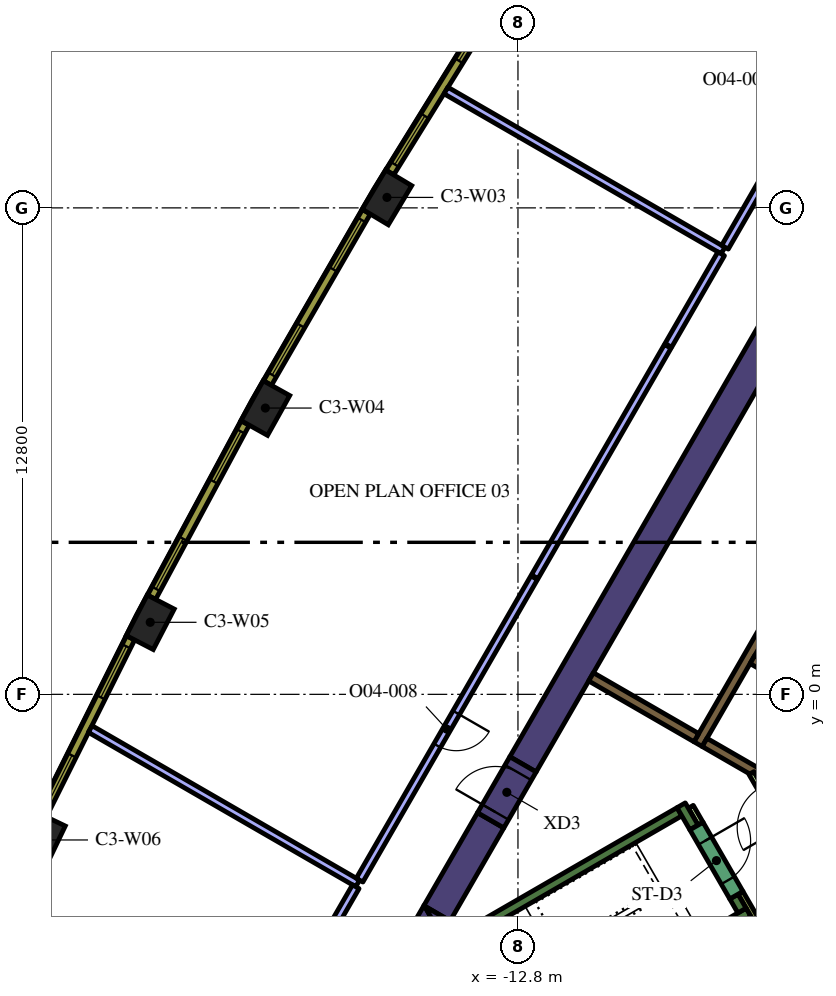
"""IFC4 building model, lengths in metres.
Left out: names, types, materials, properties, quantities, classifications, styles, units other than length and angle.
Written with IfcOpenShell. Run it as: python <this file> out.ifc"""

import sys

from ifc_helpers import new_model, si_unit, direction, frame, frame_2d, origin, origin_2d, place, context, subcontext, project, spatial, polyline, rectangle, outline, extrude, element, fill, save


model = new_model("IFC4")
c1 = context("Model", 3, precision=1e-05, world=origin(), true_north=direction((0.0, 1.0)))
c2 = subcontext(c1, "Body", "Model", "MODEL_VIEW")
j1 = project(units=[si_unit("LENGTHUNIT", "METRE"), si_unit("PLANEANGLEUNIT", "RADIAN")], contexts=[c1])
p1 = place(None, origin())
s1 = spatial("IfcSite", under=j1, at=p1, CompositionType="ELEMENT")
p2 = place(p1, origin())
s2 = spatial("IfcBuilding", under=s1, at=p2, CompositionType="ELEMENT")
p3 = place(p2, frame((0.0, 0.0, 187.8)))
s3 = spatial("IfcBuildingStorey", under=s2, at=p3, CompositionType="ELEMENT", Elevation=187.8)
for number, where, z_axis, x_axis in (
    (1, (-16.247, 13.075, 0.0), (0.0, 0.0, 1.0), (-0.513, -0.858, 0.0)),
    (2, (-19.447, 7.533, 0.0), (0.0, 0.0, 1.0), (-0.487, -0.874, 0.0)),
    (3, (-22.476, 1.896, 0.0), (0.0, 0.0, 1.0), (-0.46, -0.888, 0.0)),
    (4, (-25.332, -3.832, 0.0), (0.0, 0.0, 1.0), (-0.433, -0.902, 0.0)),
):
    element("IfcColumn", number, at=place(p3, frame(where, z_axis=z_axis, x_axis=x_axis)), inside=s3, PredefinedType="COLUMN", context=c2, shape_type="SweptSolid", body=[
        extrude(rectangle(XDim=1.2, YDim=0.8, at=origin_2d()), origin(), (0.0, 0.0, 1.0), 4.2),
    ])
p4 = place(p3, origin())
e5 = element("IfcWall", 5, at=p4, inside=s3, PredefinedType="SOLIDWALL", context=c2, shape_type="SweptSolid", body=[
    extrude(outline(polyline([(-15.047, -5.938), (-15.719, -6.326), (-15.271, -5.55), (-15.047, -5.938)])), origin(), (0.0, 0.0, 1.0), 4.2),
])
p5 = place(p3, frame((-13.518, -3.314, 0.0), z_axis=(0.0, 0.0, 1.0), x_axis=(-0.499969377405, -0.866043083026, 0.0)))
e6 = element("IfcWall", 6, at=p5, inside=s3, PredefinedType="SOLIDWALL", context=c2, shape_type="SweptSolid", body=[
    extrude(rectangle(XDim=2.824, YDim=0.8, at=frame_2d((1.412, 0.0))), origin(), (0.0, 0.0, 1.0), 4.2),
])
e7 = element("IfcWall", 7, at=p4, inside=s3, PredefinedType="SOLIDWALL", context=c2, shape_type="SweptSolid", body=[
    extrude(outline(polyline([(-14.809, -6.35), (-15.257, -5.574), (-14.585, -5.962), (-14.809, -6.35)])), origin(), (0.0, 0.0, 1.0), 4.2),
])
p6 = place(p3, frame((-12.668, -1.842, 0.0), z_axis=(0.0, 0.0, 1.0), x_axis=(0.500003640647, 0.866023301845, 0.0)))
e8 = element("IfcWall", 8, at=p6, inside=s3, PredefinedType="SOLIDWALL", context=c2, shape_type="SweptSolid", body=[
    extrude(rectangle(XDim=15.858, YDim=0.8, at=frame_2d((7.929, 0.0))), origin(), (0.0, 0.0, 1.0), 4.2),
])
p7 = place(p3, frame((-14.44, -6.49, 0.0), z_axis=(0.0, 0.0, 1.0), x_axis=(0.866022966069, 0.500004222222, 0.0)))
e9 = element("IfcWall", 9, at=p7, inside=s3, PredefinedType="SOLIDWALL", context=c2, shape_type="SweptSolid", body=[
    extrude(rectangle(XDim=6.8, YDim=0.25, at=frame_2d((3.4, 0.0))), origin(), (0.0, 0.0, 1.0), 4.2),
])
p8 = place(p3, frame((-8.168, -3.503, 0.0), z_axis=(0.0, 0.0, 1.0), x_axis=(-0.499952099219, 0.866053057547, 0.0)))
e10 = element("IfcWall", 10, at=p8, inside=s3, PredefinedType="SOLIDWALL", context=c2, shape_type="SweptSolid", body=[
    extrude(rectangle(XDim=0.675, YDim=0.25, at=frame_2d((0.337, 0.0))), origin(), (0.0, 0.0, 1.0), 4.2),
])
p9 = place(p3, frame((-12.84, -9.261, 0.0), z_axis=(0.0, 0.0, 1.0), x_axis=(0.866016039709, 0.500016218704, 0.0)))
e11 = element("IfcWall", 11, at=p9, inside=s3, PredefinedType="SOLIDWALL", context=c2, shape_type="SweptSolid", body=[
    extrude(rectangle(XDim=7.05, YDim=0.25, at=frame_2d((3.525, 0.0))), origin(), (0.0, 0.0, 1.0), 4.2),
])
p10 = place(p3, frame((-6.905, -5.69, 0.0), z_axis=(0.0, 0.0, 1.0), x_axis=(-0.500402024738, 0.865793170242, 0.0)))
e12 = element("IfcWall", 12, at=p10, inside=s3, PredefinedType="SOLIDWALL", context=c2, shape_type="SweptSolid", body=[
    extrude(rectangle(XDim=0.425, YDim=0.25, at=frame_2d((0.212, 0.0))), origin(), (0.0, 0.0, 1.0), 4.2),
])
p11 = place(p3, frame((-8.06, -1.311, 0.0), z_axis=(0.0, 0.0, 1.0), x_axis=(0.50000273126, 0.866023826885, 0.0)))
e13 = element("IfcWall", 13, at=p11, inside=s3, PredefinedType="SOLIDWALL", context=c2, shape_type="SweptSolid", body=[
    extrude(rectangle(XDim=10.33, YDim=0.25, at=frame_2d((5.165, 0.0))), origin(), (0.0, 0.0, 1.0), 4.2),
])
p12 = place(p3, frame((-4.724, -0.182, 0.0), z_axis=(0.0, 0.0, 1.0), x_axis=(-0.866008176907, 0.50002983664, 0.0)))
e14 = element("IfcWall", 14, at=p12, inside=s3, PredefinedType="SOLIDWALL", context=c2, shape_type="SweptSolid", body=[
    extrude(rectangle(XDim=2.2, YDim=0.25, at=frame_2d((1.1, 0.0))), origin(), (0.0, 0.0, 1.0), 4.2),
])
e15 = element("IfcWall", 15, at=p4, inside=s3, PredefinedType="SOLIDWALL", context=c2, shape_type="SweptSolid", body=[
    extrude(outline(polyline([(-5.922, -2.257), (-5.922, -2.257), (-5.705, -2.382), (-5.83, -2.598), (-6.483, -2.221), (-6.591, -2.033), (-6.591, -2.033), (-6.7, -2.096), (-7.952, -1.373), (-7.827, -1.156), (-5.922, -2.257)])), origin(), (0.0, 0.0, 1.0), 4.2),
])
p13 = place(p3, frame((-8.106, -1.14, 0.0), z_axis=(0.0, 0.0, 1.0), x_axis=(-0.866008981251, 0.500028443584, 0.0)))
e16 = element("IfcWall", 16, at=p13, inside=s3, PredefinedType="SOLIDWALL", context=c2, shape_type="SweptSolid", body=[
    extrude(rectangle(XDim=3.2, YDim=0.25, at=frame_2d((1.6, 0.0))), origin(), (0.0, 0.0, 1.0), 4.2),
])
p14 = place(p3, frame((-8.252, -2.958, 0.0), z_axis=(0.0, 0.0, 1.0), x_axis=(0.500174715838, -0.865924508047, 0.0)))
e17 = element("IfcWall", 17, at=p14, inside=s3, PredefinedType="PARTITIONING", context=c2, shape_type="SweptSolid", body=[
    extrude(rectangle(XDim=0.514, YDim=0.15, at=frame_2d((0.257, 0.0))), origin(), (0.0, 0.0, 1.0), 3.15),
])
p15 = place(p3, frame((-6.48, -6.027, 0.0), z_axis=(0.0, 0.0, 1.0), x_axis=(-0.499927229454, 0.866067413802, 0.0)))
e18 = element("IfcWall", 18, at=p15, inside=s3, PredefinedType="PARTITIONING", context=c2, shape_type="SweptSolid", body=[
    extrude(rectangle(XDim=0.929, YDim=0.15, at=frame_2d((0.464, 0.0))), origin(), (0.0, 0.0, 1.0), 4.2),
])
p16 = place(p3, frame((-8.103, -3.466, 0.0), z_axis=(0.0, 0.0, 1.0), x_axis=(0.500078061341, -0.865980330357, 0.0)))
e19 = element("IfcWall", 19, at=p16, inside=s3, PredefinedType="SOLIDWALL", context=c2, shape_type="SweptSolid", body=[
    extrude(rectangle(XDim=2.1, YDim=0.4, at=frame_2d((1.05, 0.0))), origin(), (0.0, 0.0, 1.0), 4.2),
])
p17 = place(p16, frame((0.45, 0.0, 0.0)))
e20 = element("IfcOpeningElement", 20, at=p17, cuts=e19, PredefinedType="OPENING", context=c2, shape_type="SweptSolid", body=[
    extrude(rectangle(XDim=1.2, YDim=2.1, at=frame_2d((0.6, 1.05))), frame((0.0, 0.21, 0.0), z_axis=(0.0, -1.0, 0.0), x_axis=(1.0, 0.0, 0.0)), (0.0, 0.0, 1.0), 0.42),
])
p18 = place(p3, frame((-5.606, -3.89, 0.0), z_axis=(0.0, 0.0, 1.0), x_axis=(-0.500027713859, 0.866009402589, 0.0)))
e21 = element("IfcWall", 21, at=p18, inside=s3, PredefinedType="PARTITIONING", context=c2, shape_type="SweptSolid", body=[
    extrude(rectangle(XDim=2.1, YDim=0.15, at=frame_2d((1.05, 0.0))), origin(), (0.0, 0.0, 1.0), 3.15),
])
p19 = place(p18, frame((0.45, 0.0, 0.0)))
e22 = element("IfcOpeningElement", 22, at=p19, cuts=e21, PredefinedType="OPENING", context=c2, shape_type="SweptSolid", body=[
    extrude(rectangle(XDim=1.2, YDim=2.1, at=frame_2d((0.6, 1.05))), frame((0.0, 0.085, 0.0), z_axis=(0.0, -1.0, 0.0), x_axis=(1.0, 0.0, 0.0)), (0.0, 0.0, 1.0), 0.17),
])
p20 = place(p3, frame((-13.518, -3.314, 0.0), z_axis=(0.0, 0.0, 1.0), x_axis=(0.500000056704, 0.866025371046, 0.0)))
e23 = element("IfcWall", 23, at=p20, inside=s3, PredefinedType="SOLIDWALL", context=c2, shape_type="SweptSolid", body=[
    extrude(rectangle(XDim=1.7, YDim=0.8, at=frame_2d((0.85, 0.0))), origin(), (0.0, 0.0, 1.0), 4.2),
])
p21 = place(p20, frame((0.25, 0.0, 0.0)))
e24 = element("IfcOpeningElement", 24, at=p21, cuts=e23, PredefinedType="OPENING", context=c2, shape_type="SweptSolid", body=[
    extrude(rectangle(XDim=1.2, YDim=2.1, at=frame_2d((0.6, 1.05))), frame((0.0, 0.41, 0.0), z_axis=(0.0, -1.0, 0.0), x_axis=(1.0, 0.0, 0.0)), (0.0, 0.0, 1.0), 0.82),
])
p22 = place(p3, frame((-7.403, 11.678, 0.0), z_axis=(0.0, 0.0, 1.0), x_axis=(-0.866029143232, 0.499993523031, 0.0)))
e25 = element("IfcWall", 25, at=p22, inside=s3, PredefinedType="PARTITIONING", context=c2, shape_type="SweptSolid", body=[
    extrude(rectangle(XDim=8.42, YDim=0.2, at=frame_2d((4.21, 0.0))), origin(), (0.0, 0.0, 1.0), 3.15),
])
p23 = place(p3, frame((-3.421, 18.574, 0.0), z_axis=(0.0, 0.0, 1.0), x_axis=(-0.499989434416, -0.866031503741, 0.0)))
e26 = element("IfcWall", 26, at=p23, inside=s3, PredefinedType="PARTITIONING", context=c2, shape_type="SweptSolid", body=[
    extrude(rectangle(XDim=7.863, YDim=0.2, at=frame_2d((3.932, 0.0))), origin(), (0.0, 0.0, 1.0), 3.15),
])
p24 = place(p23, frame((3.4, 0.0, 0.0)))
e27 = element("IfcOpeningElement", 27, at=p24, cuts=e26, PredefinedType="OPENING", context=c2, shape_type="SweptSolid", body=[
    extrude(rectangle(XDim=1.0, YDim=2.1, at=frame_2d((0.5, 1.05))), frame((0.0, 0.11, 0.0), z_axis=(0.0, -1.0, 0.0), x_axis=(1.0, 0.0, 0.0)), (0.0, 0.0, 1.0), 0.22),
])
p25 = place(p3, frame((-17.018, -4.976, 0.0), z_axis=(0.0, 0.0, 1.0), x_axis=(-0.866034495264, 0.499984252764, 0.0)))
e28 = element("IfcWall", 28, at=p25, inside=s3, PredefinedType="PARTITIONING", context=c2, shape_type="SweptSolid", body=[
    extrude(rectangle(XDim=8.126, YDim=0.2, at=frame_2d((4.063, 0.0))), origin(), (0.0, 0.0, 1.0), 3.15),
])
p26 = place(p3, frame((-8.859, 9.156, 0.0), z_axis=(0.0, 0.0, 1.0), x_axis=(-0.500010275428, -0.866019471182, 0.0)))
e29 = element("IfcWall", 29, at=p26, inside=s3, PredefinedType="PARTITIONING", context=c2, shape_type="SweptSolid", body=[
    extrude(rectangle(XDim=7.0, YDim=0.2, at=frame_2d((3.5, 0.0))), origin(), (0.0, 0.0, 1.0), 3.15),
])
p27 = place(p3, frame((-12.374, 3.068, 0.0), z_axis=(0.0, 0.0, 1.0), x_axis=(-0.50000000053, -0.866025403479, 0.0)))
e30 = element("IfcWall", 30, at=p27, inside=s3, PredefinedType="PARTITIONING", context=c2, shape_type="SweptSolid", body=[
    extrude(rectangle(XDim=9.188, YDim=0.2, at=frame_2d((4.594, 0.0))), origin(), (0.0, 0.0, 1.0), 3.15),
])
p28 = place(p27, frame((4.1, 0.0, 0.0)))
e31 = element("IfcOpeningElement", 31, at=p28, cuts=e30, PredefinedType="OPENING", context=c2, shape_type="SweptSolid", body=[
    extrude(rectangle(XDim=1.0, YDim=2.1, at=frame_2d((0.5, 1.05))), frame((0.0, 0.11, 0.0), z_axis=(0.0, -1.0, 0.0), x_axis=(1.0, 0.0, 0.0)), (0.0, 0.0, 1.0), 0.22),
])
p29 = place(p3, frame((-7.453, 11.591, 0.0), z_axis=(0.0, 0.0, 1.0), x_axis=(-0.499980749935, -0.866036517529, 0.0)))
e32 = element("IfcWall", 32, at=p29, inside=s3, PredefinedType="PARTITIONING", context=c2, shape_type="SweptSolid", body=[
    extrude(rectangle(XDim=2.782, YDim=0.2, at=frame_2d((1.391, 0.0))), origin(), (0.0, 0.0, 1.0), 3.15),
])
p30 = place(p3, frame((-17.068, -5.062, 0.0), z_axis=(0.0, 0.0, 1.0), x_axis=(-0.499935638681, -0.86606255962, 0.0)))
e33 = element("IfcWall", 33, at=p30, inside=s3, PredefinedType="PARTITIONING", context=c2, shape_type="SweptSolid", body=[
    extrude(rectangle(XDim=1.487, YDim=0.2, at=frame_2d((0.744, 0.0))), origin(), (0.0, 0.0, 1.0), 3.15),
])
p31 = place(p3, frame((-13.433, 18.156, 0.0), z_axis=(0.0, 0.0, 1.0), x_axis=(-0.526197926587, -0.850362124072, 0.0)))
e34 = element("IfcWall", 34, at=p31, inside=s3, PredefinedType="SOLIDWALL", context=c2, shape_type="SweptSolid", body=[
    extrude(rectangle(XDim=5.203, YDim=0.24, at=frame_2d((2.602, 0.0))), origin(), (0.0, 0.0, 1.0), 3.95),
])
p32 = place(p31, frame((0.248, 0.0, 0.9)))
e35 = element("IfcOpeningElement", 35, at=p32, cuts=e34, PredefinedType="OPENING", context=c2, shape_type="SweptSolid", body=[
    extrude(rectangle(XDim=1.5, YDim=2.55, at=frame_2d((0.75, 1.275))), frame((0.0, 0.13, 0.0), z_axis=(0.0, -1.0, 0.0), x_axis=(1.0, 0.0, 0.0)), (0.0, 0.0, 1.0), 0.26),
])
p33 = place(p31, frame((3.455, 0.0, 0.9)))
e36 = element("IfcOpeningElement", 36, at=p33, cuts=e34, PredefinedType="OPENING", context=c2, shape_type="SweptSolid", body=[
    extrude(rectangle(XDim=1.5, YDim=2.55, at=frame_2d((0.75, 1.275))), frame((0.0, 0.13, 0.0), z_axis=(0.0, -1.0, 0.0), x_axis=(1.0, 0.0, 0.0)), (0.0, 0.0, 1.0), 0.26),
])
p34 = place(p3, frame((-16.789, 12.697, 0.0), z_axis=(0.0, 0.0, 1.0), x_axis=(-0.500009456303, -0.866019944116, 0.0)))
e37 = element("IfcWall", 37, at=p34, inside=s3, PredefinedType="SOLIDWALL", context=c2, shape_type="SweptSolid", body=[
    extrude(rectangle(XDim=5.204, YDim=0.24, at=frame_2d((2.602, 0.0))), origin(), (0.0, 0.0, 1.0), 3.95),
])
p35 = place(p34, frame((0.248, 0.0, 0.9)))
e38 = element("IfcOpeningElement", 38, at=p35, cuts=e37, PredefinedType="OPENING", context=c2, shape_type="SweptSolid", body=[
    extrude(rectangle(XDim=1.5, YDim=2.55, at=frame_2d((0.75, 1.275))), frame((0.0, 0.13, 0.0), z_axis=(0.0, -1.0, 0.0), x_axis=(1.0, 0.0, 0.0)), (0.0, 0.0, 1.0), 0.26),
])
p36 = place(p34, frame((3.455, 0.0, 0.9)))
e39 = element("IfcOpeningElement", 39, at=p36, cuts=e37, PredefinedType="OPENING", context=c2, shape_type="SweptSolid", body=[
    extrude(rectangle(XDim=1.5, YDim=2.55, at=frame_2d((0.75, 1.275))), frame((0.0, 0.13, 0.0), z_axis=(0.0, -1.0, 0.0), x_axis=(1.0, 0.0, 0.0)), (0.0, 0.0, 1.0), 0.26),
])
p37 = place(p3, frame((-19.977, 7.139, 0.0), z_axis=(0.0, 0.0, 1.0), x_axis=(-0.473349833294, -0.880874528704, 0.0)))
e40 = element("IfcWall", 40, at=p37, inside=s3, PredefinedType="SOLIDWALL", context=c2, shape_type="SweptSolid", body=[
    extrude(rectangle(XDim=5.204, YDim=0.24, at=frame_2d((2.602, 0.0))), origin(), (0.0, 0.0, 1.0), 3.95),
])
p38 = place(p37, frame((0.248, 0.0, 0.9)))
e41 = element("IfcOpeningElement", 41, at=p38, cuts=e40, PredefinedType="OPENING", context=c2, shape_type="SweptSolid", body=[
    extrude(rectangle(XDim=1.5, YDim=2.55, at=frame_2d((0.75, 1.275))), frame((0.0, 0.13, 0.0), z_axis=(0.0, -1.0, 0.0), x_axis=(1.0, 0.0, 0.0)), (0.0, 0.0, 1.0), 0.26),
])
p39 = place(p37, frame((3.455, 0.0, 0.9)))
e42 = element("IfcOpeningElement", 42, at=p39, cuts=e40, PredefinedType="OPENING", context=c2, shape_type="SweptSolid", body=[
    extrude(rectangle(XDim=1.5, YDim=2.55, at=frame_2d((0.75, 1.275))), frame((0.0, 0.13, 0.0), z_axis=(0.0, -1.0, 0.0), x_axis=(1.0, 0.0, 0.0)), (0.0, 0.0, 1.0), 0.26),
])
p40 = place(p3, frame((-22.994, 1.485, 0.0), z_axis=(0.0, 0.0, 1.0), x_axis=(-0.446256171312, -0.8949052629, 0.0)))
e43 = element("IfcWall", 43, at=p40, inside=s3, PredefinedType="SOLIDWALL", context=c2, shape_type="SweptSolid", body=[
    extrude(rectangle(XDim=5.203, YDim=0.24, at=frame_2d((2.602, 0.0))), origin(), (0.0, 0.0, 1.0), 3.95),
])
p41 = place(p40, frame((0.248, 0.0, 0.9)))
e44 = element("IfcOpeningElement", 44, at=p41, cuts=e43, PredefinedType="OPENING", context=c2, shape_type="SweptSolid", body=[
    extrude(rectangle(XDim=1.5, YDim=2.55, at=frame_2d((0.75, 1.275))), frame((0.0, 0.13, 0.0), z_axis=(0.0, -1.0, 0.0), x_axis=(1.0, 0.0, 0.0)), (0.0, 0.0, 1.0), 0.26),
])
p42 = place(p40, frame((3.455, 0.0, 0.9)))
e45 = element("IfcOpeningElement", 45, at=p42, cuts=e43, PredefinedType="OPENING", context=c2, shape_type="SweptSolid", body=[
    extrude(rectangle(XDim=1.5, YDim=2.55, at=frame_2d((0.75, 1.275))), frame((0.0, 0.13, 0.0), z_axis=(0.0, -1.0, 0.0), x_axis=(1.0, 0.0, 0.0)), (0.0, 0.0, 1.0), 0.26),
])
p43 = place(p17, origin())
e46 = element("IfcDoor", 46, at=p43, inside=s3, OperationType="SINGLE_SWING_LEFT", PredefinedType="DOOR", context=c2, shape_type="SweptSolid", body=[
    extrude(rectangle(XDim=1.2, YDim=2.1, at=frame_2d((0.6, 1.05))), frame((0.0, 0.025, 0.0), z_axis=(0.0, -1.0, 0.0), x_axis=(1.0, 0.0, 0.0)), (0.0, 0.0, 1.0), 0.05),
])
fill(e20, e46)
p44 = place(p21, origin())
e47 = element("IfcDoor", 47, at=p44, inside=s3, OperationType="SINGLE_SWING_LEFT", PredefinedType="DOOR", context=c2, shape_type="SweptSolid", body=[
    extrude(rectangle(XDim=1.2, YDim=2.1, at=frame_2d((0.6, 1.05))), frame((0.0, 0.025, 0.0), z_axis=(0.0, -1.0, 0.0), x_axis=(1.0, 0.0, 0.0)), (0.0, 0.0, 1.0), 0.05),
])
fill(e24, e47)
p45 = place(p28, origin())
e48 = element("IfcDoor", 48, at=p45, inside=s3, OperationType="SINGLE_SWING_RIGHT", PredefinedType="DOOR", context=c2, shape_type="SweptSolid", body=[
    extrude(rectangle(XDim=1.0, YDim=2.1, at=frame_2d((0.5, 1.05))), frame((0.0, 0.025, 0.0), z_axis=(0.0, -1.0, 0.0), x_axis=(1.0, 0.0, 0.0)), (0.0, 0.0, 1.0), 0.05),
])
fill(e31, e48)
p46 = place(p32, origin())
e49 = element("IfcWindow", 49, at=p46, inside=s3, PartitioningType="SINGLE_PANEL", PredefinedType="WINDOW", context=c2, shape_type="SweptSolid", body=[
    extrude(rectangle(XDim=1.5, YDim=2.55, at=frame_2d((0.75, 1.275))), frame((0.0, 0.04, 0.0), z_axis=(0.0, -1.0, 0.0), x_axis=(1.0, 0.0, 0.0)), (0.0, 0.0, 1.0), 0.06),
])
fill(e35, e49)
p47 = place(p33, origin())
e50 = element("IfcWindow", 50, at=p47, inside=s3, PartitioningType="SINGLE_PANEL", PredefinedType="WINDOW", context=c2, shape_type="SweptSolid", body=[
    extrude(rectangle(XDim=1.5, YDim=2.55, at=frame_2d((0.75, 1.275))), frame((0.0, 0.04, 0.0), z_axis=(0.0, -1.0, 0.0), x_axis=(1.0, 0.0, 0.0)), (0.0, 0.0, 1.0), 0.06),
])
fill(e36, e50)
p48 = place(p35, origin())
e51 = element("IfcWindow", 51, at=p48, inside=s3, PartitioningType="SINGLE_PANEL", PredefinedType="WINDOW", context=c2, shape_type="SweptSolid", body=[
    extrude(rectangle(XDim=1.5, YDim=2.55, at=frame_2d((0.75, 1.275))), frame((0.0, 0.04, 0.0), z_axis=(0.0, -1.0, 0.0), x_axis=(1.0, 0.0, 0.0)), (0.0, 0.0, 1.0), 0.06),
])
fill(e38, e51)
p49 = place(p36, origin())
e52 = element("IfcWindow", 52, at=p49, inside=s3, PartitioningType="SINGLE_PANEL", PredefinedType="WINDOW", context=c2, shape_type="SweptSolid", body=[
    extrude(rectangle(XDim=1.5, YDim=2.55, at=frame_2d((0.75, 1.275))), frame((0.0, 0.04, 0.0), z_axis=(0.0, -1.0, 0.0), x_axis=(1.0, 0.0, 0.0)), (0.0, 0.0, 1.0), 0.06),
])
fill(e39, e52)
p50 = place(p38, origin())
e53 = element("IfcWindow", 53, at=p50, inside=s3, PartitioningType="SINGLE_PANEL", PredefinedType="WINDOW", context=c2, shape_type="SweptSolid", body=[
    extrude(rectangle(XDim=1.5, YDim=2.55, at=frame_2d((0.75, 1.275))), frame((0.0, 0.04, 0.0), z_axis=(0.0, -1.0, 0.0), x_axis=(1.0, 0.0, 0.0)), (0.0, 0.0, 1.0), 0.06),
])
fill(e41, e53)
p51 = place(p39, origin())
e54 = element("IfcWindow", 54, at=p51, inside=s3, PartitioningType="SINGLE_PANEL", PredefinedType="WINDOW", context=c2, shape_type="SweptSolid", body=[
    extrude(rectangle(XDim=1.5, YDim=2.55, at=frame_2d((0.75, 1.275))), frame((0.0, 0.04, 0.0), z_axis=(0.0, -1.0, 0.0), x_axis=(1.0, 0.0, 0.0)), (0.0, 0.0, 1.0), 0.06),
])
fill(e42, e54)
p52 = place(p41, origin())
e55 = element("IfcWindow", 55, at=p52, inside=s3, PartitioningType="SINGLE_PANEL", PredefinedType="WINDOW", context=c2, shape_type="SweptSolid", body=[
    extrude(rectangle(XDim=1.5, YDim=2.55, at=frame_2d((0.75, 1.275))), frame((0.0, 0.04, 0.0), z_axis=(0.0, -1.0, 0.0), x_axis=(1.0, 0.0, 0.0)), (0.0, 0.0, 1.0), 0.06),
])
fill(e44, e55)
p53 = place(p42, origin())
e56 = element("IfcWindow", 56, at=p53, inside=s3, PartitioningType="SINGLE_PANEL", PredefinedType="WINDOW", context=c2, shape_type="SweptSolid", body=[
    extrude(rectangle(XDim=1.5, YDim=2.55, at=frame_2d((0.75, 1.275))), frame((0.0, 0.04, 0.0), z_axis=(0.0, -1.0, 0.0), x_axis=(1.0, 0.0, 0.0)), (0.0, 0.0, 1.0), 0.06),
])
fill(e45, e56)
save(model, sys.argv[1])
